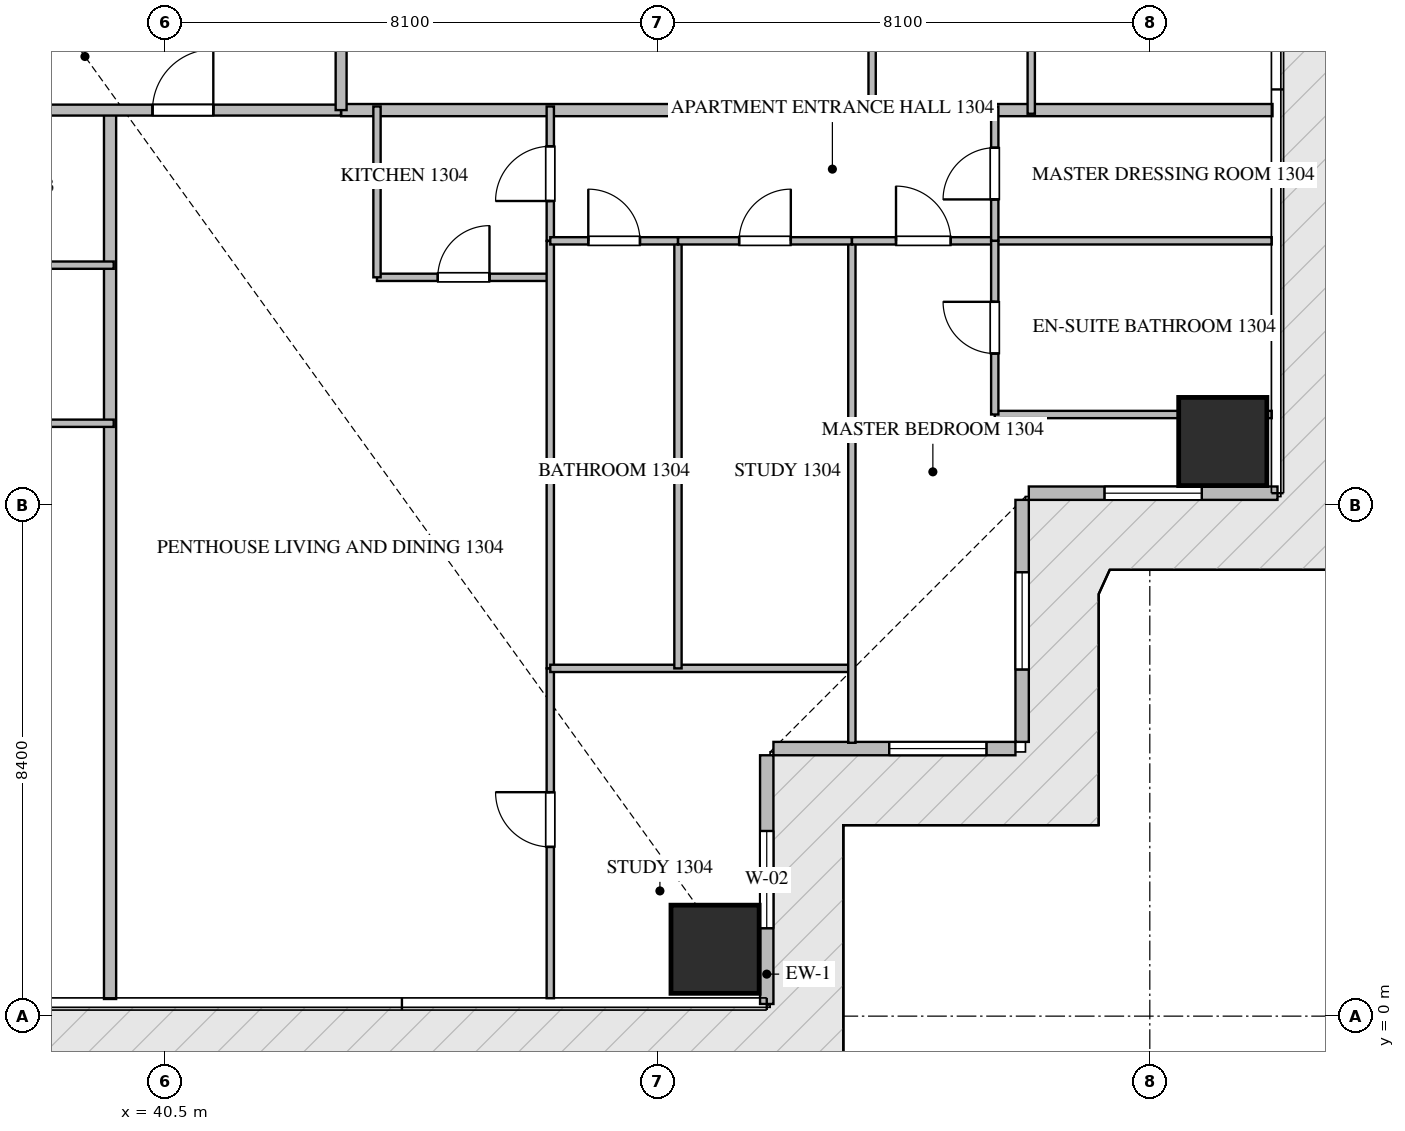
"""IFC4 building model, lengths in metres.
Left out: names, types, materials, properties, quantities, classifications, styles, units other than length and angle.
Written with IfcOpenShell. Run it as: python <this file> out.ifc"""

import sys

from ifc_helpers import new_model, si_unit, direction, frame, frame_2d, origin, origin_2d, place, context, subcontext, project, spatial, rectangle, extrude, source, transform, mapped, element, fill, save


model = new_model("IFC4")
c1 = context("Model", 3, precision=1e-05, world=origin(), true_north=direction((0.0, 1.0)))
c2 = subcontext(c1, "Body", "Model", "MODEL_VIEW")
j1 = project(units=[si_unit("LENGTHUNIT", "METRE"), si_unit("PLANEANGLEUNIT", "RADIAN")], contexts=[c1])
p1 = place(None, origin())
s1 = spatial("IfcSite", under=j1, at=p1, CompositionType="ELEMENT")
p2 = place(p1, origin())
s2 = spatial("IfcBuilding", under=s1, at=p2, CompositionType="ELEMENT")
p3 = place(p2, frame((0.0, 0.0, 56.7)))
s3 = spatial("IfcBuildingStorey", under=s2, at=p3, CompositionType="ELEMENT", Elevation=56.7)
m1 = source(origin(), c2, "Body", "SweptSolid", [
    extrude(rectangle(XDim=1.45, YDim=1.45, at=origin_2d()), origin(), (0.0, 0.0, 1.0), 3.75),
])
for number, where, z_axis, x_axis in (
    (1, (49.55, 1.1, -0.26), (0.0, 0.0, 1.0), (1.0, 0.0, 0.0)),
    (2, (57.9, 9.45, -0.26), (0.0, 0.0, 1.0), (1.0, 0.0, 0.0)),
):
    element("IfcColumn", number, at=place(p3, frame(where, z_axis=z_axis, x_axis=x_axis)), inside=s3, PredefinedType="COLUMN", context=c2, shape_type="MappedRepresentation", body=[
        mapped(m1, transform((0.0, 0.0, 0.0), scale=1.0)),
    ])
p4 = place(p3, frame((50.4, 0.2, 0.0), z_axis=(0.0, 0.0, 1.0), x_axis=(0.0, 1.0, 0.0)))
e3 = element("IfcWall", 3, at=p4, inside=s3, PredefinedType="ELEMENTEDWALL", context=c2, shape_type="SweptSolid", body=[
    extrude(rectangle(XDim=4.09, YDim=0.22, at=frame_2d((2.045, 0.0))), origin(), (0.0, 0.0, 1.0), 3.475),
])
p5 = place(p4, frame((1.245, 0.0, 0.65)))
e4 = element("IfcOpeningElement", 4, at=p5, cuts=e3, PredefinedType="OPENING", context=c2, shape_type="SweptSolid", body=[
    extrude(rectangle(XDim=1.6, YDim=2.1, at=frame_2d((0.8, 1.05))), frame((0.0, 0.12, 0.0), z_axis=(0.0, -1.0, 0.0), x_axis=(1.0, 0.0, 0.0)), (0.0, 0.0, 1.0), 0.24),
])
p6 = place(p3, frame((50.51, 4.4, 0.0), z_axis=(0.0, 0.0, 1.0), x_axis=(1.0, 0.0, 0.0)))
e5 = element("IfcWall", 5, at=p6, inside=s3, PredefinedType="ELEMENTEDWALL", context=c2, shape_type="SweptSolid", body=[
    extrude(rectangle(XDim=3.98, YDim=0.22, at=frame_2d((1.99, 0.0))), origin(), (0.0, 0.0, 1.0), 3.475),
])
p7 = place(p6, frame((1.904, 0.0, 0.65)))
e6 = element("IfcOpeningElement", 6, at=p7, cuts=e5, PredefinedType="OPENING", context=c2, shape_type="SweptSolid", body=[
    extrude(rectangle(XDim=1.6, YDim=2.1, at=frame_2d((0.8, 1.05))), frame((0.0, 0.12, 0.0), z_axis=(0.0, -1.0, 0.0), x_axis=(1.0, 0.0, 0.0)), (0.0, 0.0, 1.0), 0.24),
])
p8 = place(p3, frame((54.6, 4.51, 0.0), z_axis=(0.0, 0.0, 1.0), x_axis=(0.0, 1.0, 0.0)))
e7 = element("IfcWall", 7, at=p8, inside=s3, PredefinedType="ELEMENTEDWALL", context=c2, shape_type="SweptSolid", body=[
    extrude(rectangle(XDim=3.98, YDim=0.22, at=frame_2d((1.99, 0.0))), origin(), (0.0, 0.0, 1.0), 3.475),
])
p9 = place(p8, frame((1.19, 0.0, 0.65)))
e8 = element("IfcOpeningElement", 8, at=p9, cuts=e7, PredefinedType="OPENING", context=c2, shape_type="SweptSolid", body=[
    extrude(rectangle(XDim=1.6, YDim=2.1, at=frame_2d((0.8, 1.05))), frame((0.0, 0.12, 0.0), z_axis=(0.0, -1.0, 0.0), x_axis=(1.0, 0.0, 0.0)), (0.0, 0.0, 1.0), 0.24),
])
p10 = place(p3, frame((54.71, 8.6, 0.0), z_axis=(0.0, 0.0, 1.0), x_axis=(1.0, 0.0, 0.0)))
e9 = element("IfcWall", 9, at=p10, inside=s3, PredefinedType="ELEMENTEDWALL", context=c2, shape_type="SweptSolid", body=[
    extrude(rectangle(XDim=4.09, YDim=0.22, at=frame_2d((2.045, 0.0))), origin(), (0.0, 0.0, 1.0), 3.475),
])
p11 = place(p10, frame((1.245, 0.0, 0.65)))
e10 = element("IfcOpeningElement", 10, at=p11, cuts=e9, PredefinedType="OPENING", context=c2, shape_type="SweptSolid", body=[
    extrude(rectangle(XDim=1.6, YDim=2.1, at=frame_2d((0.8, 1.05))), frame((0.0, 0.12, 0.0), z_axis=(0.0, -1.0, 0.0), x_axis=(1.0, 0.0, 0.0)), (0.0, 0.0, 1.0), 0.24),
])
p12 = place(p3, frame((39.6, 0.282, 0.0), z_axis=(0.0, 0.0, 1.0), x_axis=(0.0, 1.0, 0.0)))
e11 = element("IfcWall", 11, at=p12, inside=s3, PredefinedType="PARTITIONING", context=c2, shape_type="SweptSolid", body=[
    extrude(rectangle(XDim=14.618, YDim=0.2, at=frame_2d((7.309, 0.0))), origin(), (0.0, 0.0, 1.0), 3.49),
])
p13 = place(p3, frame((43.4, 14.9, 0.0), z_axis=(0.0, 0.0, 1.0), x_axis=(1.0, 0.0, 0.0)))
e12 = element("IfcWall", 12, at=p13, inside=s3, PredefinedType="PARTITIONING", context=c2, shape_type="SweptSolid", body=[
    extrude(rectangle(XDim=15.318, YDim=0.2, at=frame_2d((7.659, 0.0))), origin(), (0.0, 0.0, 1.0), 3.49),
])
p14 = place(p3, frame((21.402, 14.9, 0.0), z_axis=(0.0, 0.0, 1.0), x_axis=(1.0, 0.0, 0.0)))
e13 = element("IfcWall", 13, at=p14, inside=s3, PredefinedType="PARTITIONING", context=c2, shape_type="SweptSolid", body=[
    extrude(rectangle(XDim=21.996, YDim=0.18, at=frame_2d((10.998, 0.0))), origin(), (0.0, 0.0, 1.0), 3.49),
])
p15 = place(p14, frame((1.96, 0.0, 0.0)))
e14 = element("IfcOpeningElement", 14, at=p15, cuts=e13, PredefinedType="OPENING", context=c2, shape_type="SweptSolid", body=[
    extrude(rectangle(XDim=1.0, YDim=2.15, at=frame_2d((0.5, 1.075))), frame((0.0, 0.1, 0.0), z_axis=(0.0, -1.0, 0.0), x_axis=(1.0, 0.0, 0.0)), (0.0, 0.0, 1.0), 0.2),
])
p16 = place(p14, frame((5.249, 0.0, 0.0)))
e15 = element("IfcOpeningElement", 15, at=p16, cuts=e13, PredefinedType="OPENING", context=c2, shape_type="SweptSolid", body=[
    extrude(rectangle(XDim=1.0, YDim=2.15, at=frame_2d((0.5, 1.075))), frame((0.0, 0.1, 0.0), z_axis=(0.0, -1.0, 0.0), x_axis=(1.0, 0.0, 0.0)), (0.0, 0.0, 1.0), 0.2),
])
p17 = place(p14, frame((11.653, 0.0, 0.0)))
e16 = element("IfcOpeningElement", 16, at=p17, cuts=e13, PredefinedType="OPENING", context=c2, shape_type="SweptSolid", body=[
    extrude(rectangle(XDim=1.0, YDim=2.15, at=frame_2d((0.5, 1.075))), frame((0.0, 0.1, 0.0), z_axis=(0.0, -1.0, 0.0), x_axis=(1.0, 0.0, 0.0)), (0.0, 0.0, 1.0), 0.2),
])
p18 = place(p14, frame((18.896, 0.0, 0.0)))
e17 = element("IfcOpeningElement", 17, at=p18, cuts=e13, PredefinedType="OPENING", context=c2, shape_type="SweptSolid", body=[
    extrude(rectangle(XDim=1.0, YDim=2.15, at=frame_2d((0.5, 1.075))), frame((0.0, 0.1, 0.0), z_axis=(0.0, -1.0, 0.0), x_axis=(1.0, 0.0, 0.0)), (0.0, 0.0, 1.0), 0.2),
])
p19 = place(p3, frame((43.4, 14.9, 0.0), z_axis=(0.0, 0.0, 1.0), x_axis=(0.0, 1.0, 0.0)))
e18 = element("IfcWall", 18, at=p19, inside=s3, PredefinedType="PARTITIONING", context=c2, shape_type="SweptSolid", body=[
    extrude(rectangle(XDim=20.6, YDim=0.18, at=frame_2d((10.3, 0.0))), origin(), (0.0, 0.0, 1.0), 3.49),
])
p20 = place(p19, frame((17.64, 0.0, 0.0)))
e19 = element("IfcOpeningElement", 19, at=p20, cuts=e18, PredefinedType="OPENING", context=c2, shape_type="SweptSolid", body=[
    extrude(rectangle(XDim=1.0, YDim=2.15, at=frame_2d((0.5, 1.075))), frame((0.0, 0.1, 0.0), z_axis=(0.0, -1.0, 0.0), x_axis=(1.0, 0.0, 0.0)), (0.0, 0.0, 1.0), 0.2),
])
for number, where, z_axis, x_axis in (
    (20, (35.3, 12.35, 0.0), (0.0, 0.0, 1.0), (1.0, 0.0, 0.0)),
    (21, (35.3, 9.75, 0.0), (0.0, 0.0, 1.0), (1.0, 0.0, 0.0)),
):
    element("IfcWall", number, at=place(p3, frame(where, z_axis=z_axis, x_axis=x_axis)), inside=s3, PredefinedType="PARTITIONING", context=c2, shape_type="SweptSolid", body=[
        extrude(rectangle(XDim=4.36, YDim=0.12, at=frame_2d((2.18, 0.0))), origin(), (0.0, 0.0, 1.0), 3.49),
    ])
p21 = place(p3, frame((43.99, 12.15, 0.0), z_axis=(0.0, 0.0, 1.0), x_axis=(1.0, 0.0, 0.0)))
e22 = element("IfcWall", 22, at=p21, inside=s3, PredefinedType="PARTITIONING", context=c2, shape_type="SweptSolid", body=[
    extrude(rectangle(XDim=2.85, YDim=0.12, at=frame_2d((1.425, 0.0))), origin(), (0.0, 0.0, 1.0), 3.49),
])
p22 = place(p21, frame((1.0, 0.0, 0.0)))
e23 = element("IfcOpeningElement", 23, at=p22, cuts=e22, PredefinedType="OPENING", context=c2, shape_type="SweptSolid", body=[
    extrude(rectangle(XDim=0.85, YDim=2.1, at=frame_2d((0.425, 1.05))), frame((0.0, 0.07, 0.0), z_axis=(0.0, -1.0, 0.0), x_axis=(1.0, 0.0, 0.0)), (0.0, 0.0, 1.0), 0.14),
])
p23 = place(p3, frame((43.99, 12.15, 0.0), z_axis=(0.0, 0.0, 1.0), x_axis=(0.0, 1.0, 0.0)))
e24 = element("IfcWall", 24, at=p23, inside=s3, PredefinedType="PARTITIONING", context=c2, shape_type="SweptSolid", body=[
    extrude(rectangle(XDim=2.81, YDim=0.12, at=frame_2d((1.405, 0.0))), origin(), (0.0, 0.0, 1.0), 3.49),
])
p24 = place(p3, frame((46.84, 12.75, 0.0), z_axis=(0.0, 0.0, 1.0), x_axis=(0.0, 1.0, 0.0)))
e25 = element("IfcWall", 25, at=p24, inside=s3, PredefinedType="PARTITIONING", context=c2, shape_type="SweptSolid", body=[
    extrude(rectangle(XDim=2.21, YDim=0.12, at=frame_2d((1.105, 0.0))), origin(), (0.0, 0.0, 1.0), 3.49),
])
p25 = place(p24, frame((0.655, 0.0, 0.0)))
e26 = element("IfcOpeningElement", 26, at=p25, cuts=e25, PredefinedType="OPENING", context=c2, shape_type="SweptSolid", body=[
    extrude(rectangle(XDim=0.9, YDim=2.1, at=frame_2d((0.45, 1.05))), frame((0.0, 0.07, 0.0), z_axis=(0.0, -1.0, 0.0), x_axis=(1.0, 0.0, 0.0)), (0.0, 0.0, 1.0), 0.14),
])
p26 = place(p3, frame((46.84, 0.295, 0.0), z_axis=(0.0, 0.0, 1.0), x_axis=(0.0, 1.0, 0.0)))
e27 = element("IfcWall", 27, at=p26, inside=s3, PredefinedType="PARTITIONING", context=c2, shape_type="SweptSolid", body=[
    extrude(rectangle(XDim=5.424, YDim=0.12, at=frame_2d((2.712, 0.0))), origin(), (0.0, 0.0, 1.0), 3.49),
])
p27 = place(p26, frame((2.488, 0.0, 0.0)))
e28 = element("IfcOpeningElement", 28, at=p27, cuts=e27, PredefinedType="OPENING", context=c2, shape_type="SweptSolid", body=[
    extrude(rectangle(XDim=0.9, YDim=2.1, at=frame_2d((0.45, 1.05))), frame((0.0, 0.07, 0.0), z_axis=(0.0, -1.0, 0.0), x_axis=(1.0, 0.0, 0.0)), (0.0, 0.0, 1.0), 0.14),
])
p28 = place(p3, frame((46.84, 5.721, 0.0), z_axis=(0.0, 0.0, 1.0), x_axis=(0.0, 1.0, 0.0)))
e29 = element("IfcWall", 29, at=p28, inside=s3, PredefinedType="PARTITIONING", context=c2, shape_type="SweptSolid", body=[
    extrude(rectangle(XDim=7.027, YDim=0.12, at=frame_2d((3.514, 0.0))), origin(), (0.0, 0.0, 1.0), 3.49),
])
p29 = place(p3, frame((46.84, 5.719, 0.0), z_axis=(0.0, 0.0, 1.0), x_axis=(1.0, 0.0, 0.0)))
e30 = element("IfcWall", 30, at=p29, inside=s3, PredefinedType="PARTITIONING", context=c2, shape_type="SweptSolid", body=[
    extrude(rectangle(XDim=4.96, YDim=0.12, at=frame_2d((2.48, 0.0))), origin(), (0.0, 0.0, 1.0), 3.49),
])
p30 = place(p3, frame((51.8, 4.495, 0.0), z_axis=(0.0, 0.0, 1.0), x_axis=(0.0, 1.0, 0.0)))
e31 = element("IfcWall", 31, at=p30, inside=s3, PredefinedType="PARTITIONING", context=c2, shape_type="SweptSolid", body=[
    extrude(rectangle(XDim=8.255, YDim=0.12, at=frame_2d((4.127, 0.0))), origin(), (0.0, 0.0, 1.0), 3.49),
])
p31 = place(p3, frame((48.94, 5.719, 0.0), z_axis=(0.0, 0.0, 1.0), x_axis=(0.0, 1.0, 0.0)))
e32 = element("IfcWall", 32, at=p31, inside=s3, PredefinedType="PARTITIONING", context=c2, shape_type="SweptSolid", body=[
    extrude(rectangle(XDim=7.031, YDim=0.12, at=frame_2d((3.516, 0.0))), origin(), (0.0, 0.0, 1.0), 3.49),
])
p32 = place(p3, frame((46.84, 12.75, 0.0), z_axis=(0.0, 0.0, 1.0), x_axis=(1.0, 0.0, 0.0)))
e33 = element("IfcWall", 33, at=p32, inside=s3, PredefinedType="PARTITIONING", context=c2, shape_type="SweptSolid", body=[
    extrude(rectangle(XDim=2.1, YDim=0.12, at=frame_2d((1.05, 0.0))), origin(), (0.0, 0.0, 1.0), 3.49),
])
p33 = place(p32, frame((0.625, 0.0, 0.0)))
e34 = element("IfcOpeningElement", 34, at=p33, cuts=e33, PredefinedType="OPENING", context=c2, shape_type="SweptSolid", body=[
    extrude(rectangle(XDim=0.85, YDim=2.1, at=frame_2d((0.425, 1.05))), frame((0.0, 0.07, 0.0), z_axis=(0.0, -1.0, 0.0), x_axis=(1.0, 0.0, 0.0)), (0.0, 0.0, 1.0), 0.14),
])
p34 = place(p3, frame((48.942, 12.75, 0.0), z_axis=(0.0, 0.0, 1.0), x_axis=(1.0, 0.0, 0.0)))
e35 = element("IfcWall", 35, at=p34, inside=s3, PredefinedType="PARTITIONING", context=c2, shape_type="SweptSolid", body=[
    extrude(rectangle(XDim=2.858, YDim=0.12, at=frame_2d((1.429, 0.0))), origin(), (0.0, 0.0, 1.0), 3.49),
])
p35 = place(p34, frame((1.004, 0.0, 0.0)))
e36 = element("IfcOpeningElement", 36, at=p35, cuts=e35, PredefinedType="OPENING", context=c2, shape_type="SweptSolid", body=[
    extrude(rectangle(XDim=0.85, YDim=2.1, at=frame_2d((0.425, 1.05))), frame((0.0, 0.07, 0.0), z_axis=(0.0, -1.0, 0.0), x_axis=(1.0, 0.0, 0.0)), (0.0, 0.0, 1.0), 0.14),
])
p36 = place(p3, frame((51.802, 12.75, 0.0), z_axis=(0.0, 0.0, 1.0), x_axis=(1.0, 0.0, 0.0)))
e37 = element("IfcWall", 37, at=p36, inside=s3, PredefinedType="PARTITIONING", context=c2, shape_type="SweptSolid", body=[
    extrude(rectangle(XDim=2.348, YDim=0.12, at=frame_2d((1.174, 0.0))), origin(), (0.0, 0.0, 1.0), 3.49),
])
p37 = place(p36, frame((0.724, 0.0, 0.0)))
e38 = element("IfcOpeningElement", 38, at=p37, cuts=e37, PredefinedType="OPENING", context=c2, shape_type="SweptSolid", body=[
    extrude(rectangle(XDim=0.9, YDim=2.1, at=frame_2d((0.45, 1.05))), frame((0.0, 0.07, 0.0), z_axis=(0.0, -1.0, 0.0), x_axis=(1.0, 0.0, 0.0)), (0.0, 0.0, 1.0), 0.14),
])
p38 = place(p3, frame((54.15, 9.894, 0.0), z_axis=(0.0, 0.0, 1.0), x_axis=(1.0, 0.0, 0.0)))
e39 = element("IfcWall", 39, at=p38, inside=s3, PredefinedType="PARTITIONING", context=c2, shape_type="SweptSolid", body=[
    extrude(rectangle(XDim=4.555, YDim=0.12, at=frame_2d((2.278, 0.0))), origin(), (0.0, 0.0, 1.0), 3.49),
])
p39 = place(p3, frame((54.152, 12.75, 0.0), z_axis=(0.0, 0.0, 1.0), x_axis=(1.0, 0.0, 0.0)))
e40 = element("IfcWall", 40, at=p39, inside=s3, PredefinedType="PARTITIONING", context=c2, shape_type="SweptSolid", body=[
    extrude(rectangle(XDim=4.553, YDim=0.12, at=frame_2d((2.276, 0.0))), origin(), (0.0, 0.0, 1.0), 3.49),
])
p40 = place(p3, frame((54.15, 9.894, 0.0), z_axis=(0.0, 0.0, 1.0), x_axis=(0.0, 1.0, 0.0)))
e41 = element("IfcWall", 41, at=p40, inside=s3, PredefinedType="PARTITIONING", context=c2, shape_type="SweptSolid", body=[
    extrude(rectangle(XDim=2.856, YDim=0.12, at=frame_2d((1.428, 0.0))), origin(), (0.0, 0.0, 1.0), 3.49),
])
p41 = place(p40, frame((1.003, 0.0, 0.0)))
e42 = element("IfcOpeningElement", 42, at=p41, cuts=e41, PredefinedType="OPENING", context=c2, shape_type="SweptSolid", body=[
    extrude(rectangle(XDim=0.85, YDim=2.1, at=frame_2d((0.425, 1.05))), frame((0.0, 0.07, 0.0), z_axis=(0.0, -1.0, 0.0), x_axis=(1.0, 0.0, 0.0)), (0.0, 0.0, 1.0), 0.14),
])
p42 = place(p3, frame((54.15, 12.752, 0.0), z_axis=(0.0, 0.0, 1.0), x_axis=(0.0, 1.0, 0.0)))
e43 = element("IfcWall", 43, at=p42, inside=s3, PredefinedType="PARTITIONING", context=c2, shape_type="SweptSolid", body=[
    extrude(rectangle(XDim=2.208, YDim=0.12, at=frame_2d((1.104, 0.0))), origin(), (0.0, 0.0, 1.0), 3.49),
])
p43 = place(p42, frame((0.679, 0.0, 0.0)))
e44 = element("IfcOpeningElement", 44, at=p43, cuts=e43, PredefinedType="OPENING", context=c2, shape_type="SweptSolid", body=[
    extrude(rectangle(XDim=0.85, YDim=2.1, at=frame_2d((0.425, 1.05))), frame((0.0, 0.07, 0.0), z_axis=(0.0, -1.0, 0.0), x_axis=(1.0, 0.0, 0.0)), (0.0, 0.0, 1.0), 0.14),
])
for number, where, z_axis, x_axis in (
    (45, (54.75, 14.84, 0.0), (0.0, 0.0, 1.0), (0.0, 1.0, 0.0)),
    (46, (52.133, 14.84, 0.0), (0.0, 0.0, 1.0), (0.0, 1.0, 0.0)),
):
    element("IfcWall", number, at=place(p3, frame(where, z_axis=z_axis, x_axis=x_axis)), inside=s3, PredefinedType="PARTITIONING", context=c2, shape_type="SweptSolid", body=[
        extrude(rectangle(XDim=5.41, YDim=0.12, at=frame_2d((2.705, 0.0))), origin(), (0.0, 0.0, 1.0), 3.49),
    ])
m2 = source(origin(), c2, "Body", "SweptSolid", [
    extrude(rectangle(XDim=1.6, YDim=2.1, at=frame_2d((0.8, 1.05))), frame((0.0, 0.03, 0.0), z_axis=(0.0, -1.0, 0.0), x_axis=(1.0, 0.0, 0.0)), (0.0, 0.0, 1.0), 0.06),
])
p44 = place(p5, origin())
e47 = element("IfcWindow", 47, at=p44, inside=s3, PartitioningType="SINGLE_PANEL", PredefinedType="WINDOW", context=c2, shape_type="MappedRepresentation", body=[
    mapped(m2, transform((0.0, 0.0, 0.0), scale=1.0)),
])
fill(e4, e47)
p45 = place(p7, origin())
e48 = element("IfcWindow", 48, at=p45, inside=s3, PartitioningType="SINGLE_PANEL", PredefinedType="WINDOW", context=c2, shape_type="MappedRepresentation", body=[
    mapped(m2, transform((0.0, 0.0, 0.0), scale=1.0)),
])
fill(e6, e48)
p46 = place(p9, origin())
e49 = element("IfcWindow", 49, at=p46, inside=s3, PartitioningType="SINGLE_PANEL", PredefinedType="WINDOW", context=c2, shape_type="MappedRepresentation", body=[
    mapped(m2, transform((0.0, 0.0, 0.0), scale=1.0)),
])
fill(e8, e49)
p47 = place(p11, origin())
e50 = element("IfcWindow", 50, at=p47, inside=s3, PartitioningType="SINGLE_PANEL", PredefinedType="WINDOW", context=c2, shape_type="MappedRepresentation", body=[
    mapped(m2, transform((0.0, 0.0, 0.0), scale=1.0)),
])
fill(e10, e50)
m3 = source(origin(), c2, "Body", "SweptSolid", [
    extrude(rectangle(XDim=1.0, YDim=2.15, at=frame_2d((0.5, 1.075))), frame((0.0, 0.025, 0.0), z_axis=(0.0, -1.0, 0.0), x_axis=(1.0, 0.0, 0.0)), (0.0, 0.0, 1.0), 0.05),
])
p48 = place(p18, origin())
e51 = element("IfcDoor", 51, at=p48, inside=s3, OperationType="SINGLE_SWING_RIGHT", PredefinedType="DOOR", context=c2, shape_type="MappedRepresentation", body=[
    mapped(m3, transform((0.0, 0.0, 0.0), scale=1.0)),
])
fill(e17, e51)
m4 = source(origin(), c2, "Body", "SweptSolid", [
    extrude(rectangle(XDim=0.85, YDim=2.1, at=frame_2d((0.425, 1.05))), frame((0.0, 0.025, 0.0), z_axis=(0.0, -1.0, 0.0), x_axis=(1.0, 0.0, 0.0)), (0.0, 0.0, 1.0), 0.05),
])
p49 = place(p22, origin())
e52 = element("IfcDoor", 52, at=p49, inside=s3, OperationType="SINGLE_SWING_RIGHT", PredefinedType="DOOR", context=c2, shape_type="MappedRepresentation", body=[
    mapped(m4, transform((0.0, 0.0, 0.0), scale=1.0)),
])
fill(e23, e52)
m5 = source(origin(), c2, "Body", "SweptSolid", [
    extrude(rectangle(XDim=0.9, YDim=2.1, at=frame_2d((0.45, 1.05))), frame((0.0, 0.025, 0.0), z_axis=(0.0, -1.0, 0.0), x_axis=(1.0, 0.0, 0.0)), (0.0, 0.0, 1.0), 0.05),
])
p50 = place(p25, origin())
e53 = element("IfcDoor", 53, at=p50, inside=s3, OperationType="SINGLE_SWING_LEFT", PredefinedType="DOOR", context=c2, shape_type="MappedRepresentation", body=[
    mapped(m5, transform((0.0, 0.0, 0.0), scale=1.0)),
])
fill(e26, e53)
p51 = place(p27, origin())
e54 = element("IfcDoor", 54, at=p51, inside=s3, OperationType="SINGLE_SWING_RIGHT", PredefinedType="DOOR", context=c2, shape_type="MappedRepresentation", body=[
    mapped(m5, transform((0.0, 0.0, 0.0), scale=1.0)),
])
fill(e28, e54)
p52 = place(p33, origin())
e55 = element("IfcDoor", 55, at=p52, inside=s3, OperationType="SINGLE_SWING_LEFT", PredefinedType="DOOR", context=c2, shape_type="MappedRepresentation", body=[
    mapped(m4, transform((0.0, 0.0, 0.0), scale=1.0)),
])
fill(e34, e55)
p53 = place(p35, origin())
e56 = element("IfcDoor", 56, at=p53, inside=s3, OperationType="SINGLE_SWING_RIGHT", PredefinedType="DOOR", context=c2, shape_type="MappedRepresentation", body=[
    mapped(m4, transform((0.0, 0.0, 0.0), scale=1.0)),
])
fill(e36, e56)
p54 = place(p37, origin())
e57 = element("IfcDoor", 57, at=p54, inside=s3, OperationType="SINGLE_SWING_LEFT", PredefinedType="DOOR", context=c2, shape_type="MappedRepresentation", body=[
    mapped(m5, transform((0.0, 0.0, 0.0), scale=1.0)),
])
fill(e38, e57)
p55 = place(p41, origin())
e58 = element("IfcDoor", 58, at=p55, inside=s3, OperationType="SINGLE_SWING_RIGHT", PredefinedType="DOOR", context=c2, shape_type="MappedRepresentation", body=[
    mapped(m4, transform((0.0, 0.0, 0.0), scale=1.0)),
])
fill(e42, e58)
p56 = place(p43, origin())
e59 = element("IfcDoor", 59, at=p56, inside=s3, OperationType="SINGLE_SWING_LEFT", PredefinedType="DOOR", context=c2, shape_type="MappedRepresentation", body=[
    mapped(m4, transform((0.0, 0.0, 0.0), scale=1.0)),
])
fill(e44, e59)
save(model, sys.argv[1])
